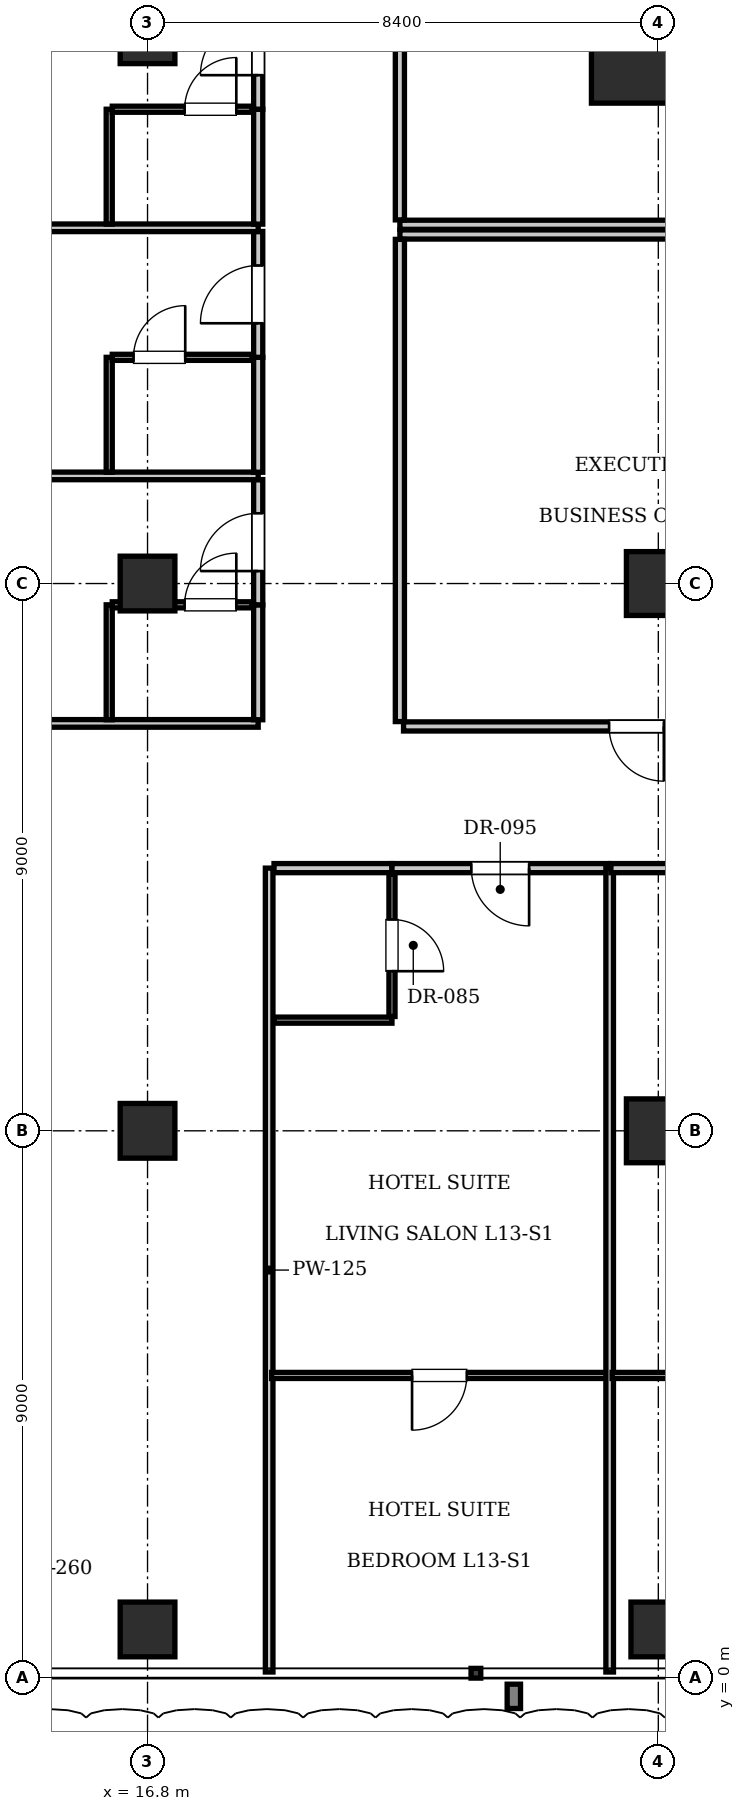
"""IFC4 building model, lengths in metres.
Left out: names, types, materials, properties, quantities, classifications, styles, units other than length and angle.
Written with IfcOpenShell. Run it as: python <this file> out.ifc"""

import sys

from ifc_helpers import new_model, si_unit, direction, frame, frame_2d, origin, origin_2d, place, context, subcontext, project, spatial, rectangle, extrude, element, fill, save


model = new_model("IFC4")
c1 = context("Model", 3, precision=1e-05, world=origin(), true_north=direction((0.0, 1.0)))
c2 = subcontext(c1, "Body", "Model", "MODEL_VIEW")
j1 = project(units=[si_unit("LENGTHUNIT", "METRE"), si_unit("PLANEANGLEUNIT", "RADIAN")], contexts=[c1])
p1 = place(None, origin())
s1 = spatial("IfcSite", under=j1, at=p1, CompositionType="ELEMENT")
p2 = place(p1, origin())
s2 = spatial("IfcBuilding", under=s1, at=p2, CompositionType="ELEMENT")
p3 = place(p2, frame((0.0, 0.0, 57.75)))
s3 = spatial("IfcBuildingStorey", under=s2, at=p3, CompositionType="ELEMENT", Elevation=57.75)
p4 = place(p3, frame((25.2, 27.0, 0.0), z_axis=(0.0, 0.0, 1.0), x_axis=(1.0, 0.0, 0.0)))
e1 = element("IfcColumn", 1, at=p4, inside=s3, PredefinedType="COLUMN", context=c2, shape_type="SweptSolid", body=[
    extrude(rectangle(XDim=2.2, YDim=2.2, at=origin_2d()), origin(), (0.0, 0.0, 1.0), 3.85),
])
for number, where, z_axis, x_axis in (
    (2, (25.2, 18.0, 0.0), (0.0, 0.0, 1.0), (1.0, 0.0, 0.0)),
    (3, (25.2, 9.0, 0.0), (0.0, 0.0, 1.0), (1.0, 0.0, 0.0)),
):
    element("IfcColumn", number, at=place(p3, frame(where, z_axis=z_axis, x_axis=x_axis)), inside=s3, PredefinedType="COLUMN", context=c2, shape_type="SweptSolid", body=[
        extrude(rectangle(XDim=1.05, YDim=1.05, at=origin_2d()), origin(), (0.0, 0.0, 1.0), 3.85),
    ])
for number, where, z_axis, x_axis in (
    (4, (16.8, 9.0, 0.0), (0.0, 0.0, 1.0), (1.0, 0.0, 0.0)),
    (5, (16.8, 18.0, 0.0), (0.0, 0.0, 1.0), (1.0, 0.0, 0.0)),
    (6, (16.8, 27.0, 0.0), (0.0, 0.0, 1.0), (1.0, 0.0, 0.0)),
    (7, (16.8, 0.8, 0.0), (0.0, 0.0, 1.0), (1.0, 0.0, 0.0)),
    (8, (25.2, 0.8, 0.0), (0.0, 0.0, 1.0), (1.0, 0.0, 0.0)),
):
    element("IfcColumn", number, at=place(p3, frame(where, z_axis=z_axis, x_axis=x_axis)), inside=s3, PredefinedType="COLUMN", context=c2, shape_type="SweptSolid", body=[
        extrude(rectangle(XDim=0.9, YDim=0.9, at=origin_2d()), origin(), (0.0, 0.0, 1.0), 3.85),
    ])
p5 = place(p3, frame((20.95, 23.9, 0.0), z_axis=(0.0, 0.0, 1.0), x_axis=(1.0, 0.0, 0.0)))
e9 = element("IfcWall", 9, at=p5, inside=s3, PredefinedType="PARTITIONING", context=c2, shape_type="SweptSolid", body=[
    extrude(rectangle(XDim=33.7, YDim=0.15, at=frame_2d((16.85, 0.0))), origin(), (0.0, 0.0, 1.0), 3.61),
])
p6 = place(p3, frame((20.95, 23.98, 0.0), z_axis=(0.0, 0.0, 1.0), x_axis=(0.0, 1.0, 0.0)))
e10 = element("IfcWall", 10, at=p6, inside=s3, PredefinedType="PARTITIONING", context=c2, shape_type="SweptSolid", body=[
    extrude(rectangle(XDim=7.94, YDim=0.15, at=frame_2d((3.97, 0.0))), origin(), (0.0, 0.0, 1.0), 3.255),
])
p7 = place(p3, frame((20.95, 23.74, 0.0), z_axis=(0.0, 0.0, 1.0), x_axis=(1.0, 0.0, 0.0)))
e11 = element("IfcWall", 11, at=p7, inside=s3, PredefinedType="PARTITIONING", context=c2, shape_type="SweptSolid", body=[
    extrude(rectangle(XDim=33.7, YDim=0.15, at=frame_2d((16.85, 0.0))), origin(), (0.0, 0.0, 1.0), 3.61),
])
p8 = place(p3, frame((20.95, 15.73, 0.0), z_axis=(0.0, 0.0, 1.0), x_axis=(0.0, 1.0, 0.0)))
e12 = element("IfcWall", 12, at=p8, inside=s3, PredefinedType="PARTITIONING", context=c2, shape_type="SweptSolid", body=[
    extrude(rectangle(XDim=7.93, YDim=0.15, at=frame_2d((3.965, 0.0))), origin(), (0.0, 0.0, 1.0), 3.207),
])
p9 = place(p3, frame((21.01, 15.65, 0.0), z_axis=(0.0, 0.0, 1.0), x_axis=(1.0, 0.0, 0.0)))
e13 = element("IfcWall", 13, at=p9, inside=s3, PredefinedType="PARTITIONING", context=c2, shape_type="SweptSolid", body=[
    extrude(rectangle(XDim=7.661, YDim=0.15, at=frame_2d((3.831, 0.0))), origin(), (0.0, 0.0, 1.0), 3.61),
])
p10 = place(p9, frame((3.381, 0.0, 0.0)))
e14 = element("IfcOpeningElement", 14, at=p10, cuts=e13, PredefinedType="OPENING", context=c2, shape_type="SweptSolid", body=[
    extrude(rectangle(XDim=0.9, YDim=2.1, at=frame_2d((0.45, 1.05))), frame((0.0, 0.085, 0.0), z_axis=(0.0, -1.0, 0.0), x_axis=(1.0, 0.0, 0.0)), (0.0, 0.0, 1.0), 0.17),
])
p11 = place(p3, frame((18.8, 0.1, 0.0), z_axis=(0.0, 0.0, 1.0), x_axis=(0.0, 1.0, 0.0)))
e15 = element("IfcWall", 15, at=p11, inside=s3, PredefinedType="PARTITIONING", context=c2, shape_type="SweptSolid", body=[
    extrude(rectangle(XDim=13.22, YDim=0.125, at=frame_2d((6.61, 0.0))), origin(), (0.0, 0.0, 1.0), 3.61),
])
p12 = place(p3, frame((18.88, 13.32, 0.0), z_axis=(0.0, 0.0, 1.0), x_axis=(1.0, 0.0, 0.0)))
e16 = element("IfcWall", 16, at=p12, inside=s3, PredefinedType="PARTITIONING", context=c2, shape_type="SweptSolid", body=[
    extrude(rectangle(XDim=1.94, YDim=0.15, at=frame_2d((0.97, 0.0))), origin(), (0.0, 0.0, 1.0), 3.61),
])
p13 = place(p3, frame((18.88, 10.82, 0.0), z_axis=(0.0, 0.0, 1.0), x_axis=(1.0, 0.0, 0.0)))
e17 = element("IfcWall", 17, at=p13, inside=s3, PredefinedType="PARTITIONING", context=c2, shape_type="SweptSolid", body=[
    extrude(rectangle(XDim=1.94, YDim=0.1, at=frame_2d((0.97, 0.0))), origin(), (0.0, 0.0, 1.0), 3.61),
])
p14 = place(p3, frame((20.82, 10.88, 0.0), z_axis=(0.0, 0.0, 1.0), x_axis=(0.0, 1.0, 0.0)))
e18 = element("IfcWall", 18, at=p14, inside=s3, PredefinedType="PARTITIONING", context=c2, shape_type="SweptSolid", body=[
    extrude(rectangle(XDim=2.34, YDim=0.1, at=frame_2d((1.17, 0.0))), origin(), (0.0, 0.0, 1.0), 3.61),
])
p15 = place(p14, frame((0.745, 0.0, 0.0)))
e19 = element("IfcOpeningElement", 19, at=p15, cuts=e18, PredefinedType="OPENING", context=c2, shape_type="SweptSolid", body=[
    extrude(rectangle(XDim=0.85, YDim=2.1, at=frame_2d((0.425, 1.05))), frame((0.0, 0.06, 0.0), z_axis=(0.0, -1.0, 0.0), x_axis=(1.0, 0.0, 0.0)), (0.0, 0.0, 1.0), 0.12),
])
p16 = place(p3, frame((20.82, 13.32, 0.0), z_axis=(0.0, 0.0, 1.0), x_axis=(1.0, 0.0, 0.0)))
e20 = element("IfcWall", 20, at=p16, inside=s3, PredefinedType="PARTITIONING", context=c2, shape_type="SweptSolid", body=[
    extrude(rectangle(XDim=3.56, YDim=0.15, at=frame_2d((1.78, 0.0))), origin(), (0.0, 0.0, 1.0), 3.61),
])
p17 = place(p16, frame((1.305, 0.0, 0.0)))
e21 = element("IfcOpeningElement", 21, at=p17, cuts=e20, PredefinedType="OPENING", context=c2, shape_type="SweptSolid", body=[
    extrude(rectangle(XDim=0.95, YDim=2.15, at=frame_2d((0.475, 1.075))), frame((0.0, 0.085, 0.0), z_axis=(0.0, -1.0, 0.0), x_axis=(1.0, 0.0, 0.0)), (0.0, 0.0, 1.0), 0.17),
])
p18 = place(p3, frame((18.84, 4.977, 0.0), z_axis=(0.0, 0.0, 1.0), x_axis=(1.0, 0.0, 0.0)))
e22 = element("IfcWall", 22, at=p18, inside=s3, PredefinedType="PARTITIONING", context=c2, shape_type="SweptSolid", body=[
    extrude(rectangle(XDim=5.52, YDim=0.1, at=frame_2d((2.76, 0.0))), origin(), (0.0, 0.0, 1.0), 3.61),
])
p19 = place(p18, frame((2.31, 0.0, 0.0)))
e23 = element("IfcOpeningElement", 23, at=p19, cuts=e22, PredefinedType="OPENING", context=c2, shape_type="SweptSolid", body=[
    extrude(rectangle(XDim=0.9, YDim=2.1, at=frame_2d((0.45, 1.05))), frame((0.0, 0.06, 0.0), z_axis=(0.0, -1.0, 0.0), x_axis=(1.0, 0.0, 0.0)), (0.0, 0.0, 1.0), 0.12),
])
p20 = place(p3, frame((24.4, 0.1, 0.0), z_axis=(0.0, 0.0, 1.0), x_axis=(0.0, 1.0, 0.0)))
e24 = element("IfcWall", 24, at=p20, inside=s3, PredefinedType="PARTITIONING", context=c2, shape_type="SweptSolid", body=[
    extrude(rectangle(XDim=13.22, YDim=0.125, at=frame_2d((6.61, 0.0))), origin(), (0.0, 0.0, 1.0), 3.61),
])
p21 = place(p3, frame((24.42, 13.32, 0.0), z_axis=(0.0, 0.0, 1.0), x_axis=(1.0, 0.0, 0.0)))
e25 = element("IfcWall", 25, at=p21, inside=s3, PredefinedType="PARTITIONING", context=c2, shape_type="SweptSolid", body=[
    extrude(rectangle(XDim=3.56, YDim=0.15, at=frame_2d((1.78, 0.0))), origin(), (0.0, 0.0, 1.0), 3.61),
])
p22 = place(p21, frame((1.305, 0.0, 0.0)))
e26 = element("IfcOpeningElement", 26, at=p22, cuts=e25, PredefinedType="OPENING", context=c2, shape_type="SweptSolid", body=[
    extrude(rectangle(XDim=0.95, YDim=2.15, at=frame_2d((0.475, 1.075))), frame((0.0, 0.085, 0.0), z_axis=(0.0, -1.0, 0.0), x_axis=(1.0, 0.0, 0.0)), (0.0, 0.0, 1.0), 0.17),
])
p23 = place(p3, frame((24.44, 4.977, 0.0), z_axis=(0.0, 0.0, 1.0), x_axis=(1.0, 0.0, 0.0)))
e27 = element("IfcWall", 27, at=p23, inside=s3, PredefinedType="PARTITIONING", context=c2, shape_type="SweptSolid", body=[
    extrude(rectangle(XDim=5.52, YDim=0.1, at=frame_2d((2.76, 0.0))), origin(), (0.0, 0.0, 1.0), 3.61),
])
p24 = place(p23, frame((2.31, 0.0, 0.0)))
e28 = element("IfcOpeningElement", 28, at=p24, cuts=e27, PredefinedType="OPENING", context=c2, shape_type="SweptSolid", body=[
    extrude(rectangle(XDim=0.9, YDim=2.1, at=frame_2d((0.45, 1.05))), frame((0.0, 0.06, 0.0), z_axis=(0.0, -1.0, 0.0), x_axis=(1.0, 0.0, 0.0)), (0.0, 0.0, 1.0), 0.12),
])
p25 = place(p3, frame((10.9, 15.7, 0.0), z_axis=(0.0, 0.0, 1.0), x_axis=(1.0, 0.0, 0.0)))
e29 = element("IfcWall", 29, at=p25, inside=s3, PredefinedType="PARTITIONING", context=c2, shape_type="SweptSolid", body=[
    extrude(rectangle(XDim=7.72, YDim=0.125, at=frame_2d((3.86, 0.0))), origin(), (0.0, 0.0, 1.0), 3.61),
])
p26 = place(p3, frame((18.62, 15.76, 0.0), z_axis=(0.0, 0.0, 1.0), x_axis=(0.0, 1.0, 0.0)))
e30 = element("IfcWall", 30, at=p26, inside=s3, PredefinedType="PARTITIONING", context=c2, shape_type="SweptSolid", body=[
    extrude(rectangle(XDim=1.89, YDim=0.15, at=frame_2d((0.945, 0.0))), origin(), (0.0, 0.0, 1.0), 3.61),
])
p27 = place(p3, frame((18.62, 17.65, 0.0), z_axis=(0.0, 0.0, 1.0), x_axis=(0.0, 1.0, 0.0)))
e31 = element("IfcWall", 31, at=p27, inside=s3, PredefinedType="PARTITIONING", context=c2, shape_type="SweptSolid", body=[
    extrude(rectangle(XDim=2.06, YDim=0.15, at=frame_2d((1.03, 0.0))), origin(), (0.0, 0.0, 1.0), 3.61),
])
p28 = place(p27, frame((0.555, 0.0, 0.0)))
e32 = element("IfcOpeningElement", 32, at=p28, cuts=e31, PredefinedType="OPENING", context=c2, shape_type="SweptSolid", body=[
    extrude(rectangle(XDim=0.95, YDim=2.15, at=frame_2d((0.475, 1.075))), frame((0.0, 0.085, 0.0), z_axis=(0.0, -1.0, 0.0), x_axis=(1.0, 0.0, 0.0)), (0.0, 0.0, 1.0), 0.17),
])
p29 = place(p3, frame((16.17, 15.76, 0.0), z_axis=(0.0, 0.0, 1.0), x_axis=(0.0, 1.0, 0.0)))
e33 = element("IfcWall", 33, at=p29, inside=s3, PredefinedType="PARTITIONING", context=c2, shape_type="SweptSolid", body=[
    extrude(rectangle(XDim=1.89, YDim=0.1, at=frame_2d((0.945, 0.0))), origin(), (0.0, 0.0, 1.0), 3.61),
])
p30 = place(p3, frame((16.22, 17.65, 0.0), z_axis=(0.0, 0.0, 1.0), x_axis=(1.0, 0.0, 0.0)))
e34 = element("IfcWall", 34, at=p30, inside=s3, PredefinedType="PARTITIONING", context=c2, shape_type="SweptSolid", body=[
    extrude(rectangle(XDim=2.3, YDim=0.1, at=frame_2d((1.15, 0.0))), origin(), (0.0, 0.0, 1.0), 3.61),
])
p31 = place(p30, frame((1.19, 0.0, 0.0)))
e35 = element("IfcOpeningElement", 35, at=p31, cuts=e34, PredefinedType="OPENING", context=c2, shape_type="SweptSolid", body=[
    extrude(rectangle(XDim=0.85, YDim=2.1, at=frame_2d((0.425, 1.05))), frame((0.0, 0.06, 0.0), z_axis=(0.0, -1.0, 0.0), x_axis=(1.0, 0.0, 0.0)), (0.0, 0.0, 1.0), 0.12),
])
p32 = place(p3, frame((10.9, 19.77, 0.0), z_axis=(0.0, 0.0, 1.0), x_axis=(1.0, 0.0, 0.0)))
e36 = element("IfcWall", 36, at=p32, inside=s3, PredefinedType="PARTITIONING", context=c2, shape_type="SweptSolid", body=[
    extrude(rectangle(XDim=7.72, YDim=0.125, at=frame_2d((3.86, 0.0))), origin(), (0.0, 0.0, 1.0), 3.61),
])
p33 = place(p3, frame((18.62, 19.83, 0.0), z_axis=(0.0, 0.0, 1.0), x_axis=(0.0, 1.0, 0.0)))
e37 = element("IfcWall", 37, at=p33, inside=s3, PredefinedType="PARTITIONING", context=c2, shape_type="SweptSolid", body=[
    extrude(rectangle(XDim=1.89, YDim=0.15, at=frame_2d((0.945, 0.0))), origin(), (0.0, 0.0, 1.0), 3.61),
])
p34 = place(p3, frame((18.62, 21.72, 0.0), z_axis=(0.0, 0.0, 1.0), x_axis=(0.0, 1.0, 0.0)))
e38 = element("IfcWall", 38, at=p34, inside=s3, PredefinedType="PARTITIONING", context=c2, shape_type="SweptSolid", body=[
    extrude(rectangle(XDim=2.07, YDim=0.15, at=frame_2d((1.035, 0.0))), origin(), (0.0, 0.0, 1.0), 3.61),
])
p35 = place(p34, frame((0.56, 0.0, 0.0)))
e39 = element("IfcOpeningElement", 39, at=p35, cuts=e38, PredefinedType="OPENING", context=c2, shape_type="SweptSolid", body=[
    extrude(rectangle(XDim=0.95, YDim=2.15, at=frame_2d((0.475, 1.075))), frame((0.0, 0.085, 0.0), z_axis=(0.0, -1.0, 0.0), x_axis=(1.0, 0.0, 0.0)), (0.0, 0.0, 1.0), 0.17),
])
p36 = place(p3, frame((16.17, 19.83, 0.0), z_axis=(0.0, 0.0, 1.0), x_axis=(0.0, 1.0, 0.0)))
e40 = element("IfcWall", 40, at=p36, inside=s3, PredefinedType="PARTITIONING", context=c2, shape_type="SweptSolid", body=[
    extrude(rectangle(XDim=1.89, YDim=0.1, at=frame_2d((0.945, 0.0))), origin(), (0.0, 0.0, 1.0), 3.61),
])
p37 = place(p3, frame((16.22, 21.72, 0.0), z_axis=(0.0, 0.0, 1.0), x_axis=(1.0, 0.0, 0.0)))
e41 = element("IfcWall", 41, at=p37, inside=s3, PredefinedType="PARTITIONING", context=c2, shape_type="SweptSolid", body=[
    extrude(rectangle(XDim=2.3, YDim=0.1, at=frame_2d((1.15, 0.0))), origin(), (0.0, 0.0, 1.0), 3.61),
])
p38 = place(p37, frame((0.35, 0.0, 0.0)))
e42 = element("IfcOpeningElement", 42, at=p38, cuts=e41, PredefinedType="OPENING", context=c2, shape_type="SweptSolid", body=[
    extrude(rectangle(XDim=0.85, YDim=2.1, at=frame_2d((0.425, 1.05))), frame((0.0, 0.06, 0.0), z_axis=(0.0, -1.0, 0.0), x_axis=(1.0, 0.0, 0.0)), (0.0, 0.0, 1.0), 0.12),
])
p39 = place(p3, frame((10.9, 23.85, 0.0), z_axis=(0.0, 0.0, 1.0), x_axis=(1.0, 0.0, 0.0)))
e43 = element("IfcWall", 43, at=p39, inside=s3, PredefinedType="PARTITIONING", context=c2, shape_type="SweptSolid", body=[
    extrude(rectangle(XDim=7.72, YDim=0.125, at=frame_2d((3.86, 0.0))), origin(), (0.0, 0.0, 1.0), 3.61),
])
p40 = place(p3, frame((18.62, 23.91, 0.0), z_axis=(0.0, 0.0, 1.0), x_axis=(0.0, 1.0, 0.0)))
e44 = element("IfcWall", 44, at=p40, inside=s3, PredefinedType="PARTITIONING", context=c2, shape_type="SweptSolid", body=[
    extrude(rectangle(XDim=1.89, YDim=0.15, at=frame_2d((0.945, 0.0))), origin(), (0.0, 0.0, 1.0), 3.61),
])
p41 = place(p3, frame((18.62, 25.8, 0.0), z_axis=(0.0, 0.0, 1.0), x_axis=(0.0, 1.0, 0.0)))
e45 = element("IfcWall", 45, at=p41, inside=s3, PredefinedType="PARTITIONING", context=c2, shape_type="SweptSolid", body=[
    extrude(rectangle(XDim=2.07, YDim=0.15, at=frame_2d((1.035, 0.0))), origin(), (0.0, 0.0, 1.0), 3.61),
])
p42 = place(p41, frame((0.56, 0.0, 0.0)))
e46 = element("IfcOpeningElement", 46, at=p42, cuts=e45, PredefinedType="OPENING", context=c2, shape_type="SweptSolid", body=[
    extrude(rectangle(XDim=0.95, YDim=2.15, at=frame_2d((0.475, 1.075))), frame((0.0, 0.085, 0.0), z_axis=(0.0, -1.0, 0.0), x_axis=(1.0, 0.0, 0.0)), (0.0, 0.0, 1.0), 0.17),
])
p43 = place(p3, frame((16.17, 23.91, 0.0), z_axis=(0.0, 0.0, 1.0), x_axis=(0.0, 1.0, 0.0)))
e47 = element("IfcWall", 47, at=p43, inside=s3, PredefinedType="PARTITIONING", context=c2, shape_type="SweptSolid", body=[
    extrude(rectangle(XDim=1.89, YDim=0.1, at=frame_2d((0.945, 0.0))), origin(), (0.0, 0.0, 1.0), 3.61),
])
p44 = place(p3, frame((16.22, 25.8, 0.0), z_axis=(0.0, 0.0, 1.0), x_axis=(1.0, 0.0, 0.0)))
e48 = element("IfcWall", 48, at=p44, inside=s3, PredefinedType="PARTITIONING", context=c2, shape_type="SweptSolid", body=[
    extrude(rectangle(XDim=2.3, YDim=0.1, at=frame_2d((1.15, 0.0))), origin(), (0.0, 0.0, 1.0), 3.61),
])
p45 = place(p44, frame((1.19, 0.0, 0.0)))
e49 = element("IfcOpeningElement", 49, at=p45, cuts=e48, PredefinedType="OPENING", context=c2, shape_type="SweptSolid", body=[
    extrude(rectangle(XDim=0.85, YDim=2.1, at=frame_2d((0.425, 1.05))), frame((0.0, 0.06, 0.0), z_axis=(0.0, -1.0, 0.0), x_axis=(1.0, 0.0, 0.0)), (0.0, 0.0, 1.0), 0.12),
])
p46 = place(p10, frame((0.9, 0.0, 0.0), z_axis=(0.0, 0.0, 1.0), x_axis=(-1.0, 0.0, 0.0)))
e50 = element("IfcDoor", 50, at=p46, inside=s3, OperationType="SINGLE_SWING_LEFT", PredefinedType="DOOR", context=c2, shape_type="SweptSolid", body=[
    extrude(rectangle(XDim=0.9, YDim=2.1, at=frame_2d((0.45, 1.05))), frame((0.0, 0.025, 0.0), z_axis=(0.0, -1.0, 0.0), x_axis=(1.0, 0.0, 0.0)), (0.0, 0.0, 1.0), 0.05),
])
fill(e14, e50)
p47 = place(p15, frame((0.85, 0.0, 0.0), z_axis=(0.0, 0.0, 1.0), x_axis=(-1.0, 0.0, 0.0)))
e51 = element("IfcDoor", 51, at=p47, inside=s3, OperationType="SINGLE_SWING_RIGHT", PredefinedType="DOOR", context=c2, shape_type="SweptSolid", body=[
    extrude(rectangle(XDim=0.85, YDim=2.1, at=frame_2d((0.425, 1.05))), frame((0.0, 0.025, 0.0), z_axis=(0.0, -1.0, 0.0), x_axis=(1.0, 0.0, 0.0)), (0.0, 0.0, 1.0), 0.05),
])
fill(e19, e51)
p48 = place(p17, frame((0.95, 0.0, 0.0), z_axis=(0.0, 0.0, 1.0), x_axis=(-1.0, 0.0, 0.0)))
e52 = element("IfcDoor", 52, at=p48, inside=s3, OperationType="SINGLE_SWING_LEFT", PredefinedType="DOOR", context=c2, shape_type="SweptSolid", body=[
    extrude(rectangle(XDim=0.95, YDim=2.15, at=frame_2d((0.475, 1.075))), frame((0.0, 0.025, 0.0), z_axis=(0.0, -1.0, 0.0), x_axis=(1.0, 0.0, 0.0)), (0.0, 0.0, 1.0), 0.05),
])
fill(e21, e52)
p49 = place(p19, frame((0.9, 0.0, 0.0), z_axis=(0.0, 0.0, 1.0), x_axis=(-1.0, 0.0, 0.0)))
e53 = element("IfcDoor", 53, at=p49, inside=s3, OperationType="SINGLE_SWING_RIGHT", PredefinedType="DOOR", context=c2, shape_type="SweptSolid", body=[
    extrude(rectangle(XDim=0.9, YDim=2.1, at=frame_2d((0.45, 1.05))), frame((0.0, 0.025, 0.0), z_axis=(0.0, -1.0, 0.0), x_axis=(1.0, 0.0, 0.0)), (0.0, 0.0, 1.0), 0.05),
])
fill(e23, e53)
p50 = place(p31, origin())
e54 = element("IfcDoor", 54, at=p50, inside=s3, OperationType="SINGLE_SWING_RIGHT", PredefinedType="DOOR", context=c2, shape_type="SweptSolid", body=[
    extrude(rectangle(XDim=0.85, YDim=2.1, at=frame_2d((0.425, 1.05))), frame((0.0, 0.025, 0.0), z_axis=(0.0, -1.0, 0.0), x_axis=(1.0, 0.0, 0.0)), (0.0, 0.0, 1.0), 0.05),
])
fill(e35, e54)
p51 = place(p28, origin())
e55 = element("IfcDoor", 55, at=p51, inside=s3, OperationType="SINGLE_SWING_LEFT", PredefinedType="DOOR", context=c2, shape_type="SweptSolid", body=[
    extrude(rectangle(XDim=0.95, YDim=2.15, at=frame_2d((0.475, 1.075))), frame((0.0, 0.025, 0.0), z_axis=(0.0, -1.0, 0.0), x_axis=(1.0, 0.0, 0.0)), (0.0, 0.0, 1.0), 0.05),
])
fill(e32, e55)
p52 = place(p38, origin())
e56 = element("IfcDoor", 56, at=p52, inside=s3, OperationType="SINGLE_SWING_RIGHT", PredefinedType="DOOR", context=c2, shape_type="SweptSolid", body=[
    extrude(rectangle(XDim=0.85, YDim=2.1, at=frame_2d((0.425, 1.05))), frame((0.0, 0.025, 0.0), z_axis=(0.0, -1.0, 0.0), x_axis=(1.0, 0.0, 0.0)), (0.0, 0.0, 1.0), 0.05),
])
fill(e42, e56)
p53 = place(p35, origin())
e57 = element("IfcDoor", 57, at=p53, inside=s3, OperationType="SINGLE_SWING_LEFT", PredefinedType="DOOR", context=c2, shape_type="SweptSolid", body=[
    extrude(rectangle(XDim=0.95, YDim=2.15, at=frame_2d((0.475, 1.075))), frame((0.0, 0.025, 0.0), z_axis=(0.0, -1.0, 0.0), x_axis=(1.0, 0.0, 0.0)), (0.0, 0.0, 1.0), 0.05),
])
fill(e39, e57)
p54 = place(p45, origin())
e58 = element("IfcDoor", 58, at=p54, inside=s3, OperationType="SINGLE_SWING_RIGHT", PredefinedType="DOOR", context=c2, shape_type="SweptSolid", body=[
    extrude(rectangle(XDim=0.85, YDim=2.1, at=frame_2d((0.425, 1.05))), frame((0.0, 0.025, 0.0), z_axis=(0.0, -1.0, 0.0), x_axis=(1.0, 0.0, 0.0)), (0.0, 0.0, 1.0), 0.05),
])
fill(e49, e58)
p55 = place(p42, origin())
e59 = element("IfcDoor", 59, at=p55, inside=s3, OperationType="SINGLE_SWING_LEFT", PredefinedType="DOOR", context=c2, shape_type="SweptSolid", body=[
    extrude(rectangle(XDim=0.95, YDim=2.15, at=frame_2d((0.475, 1.075))), frame((0.0, 0.025, 0.0), z_axis=(0.0, -1.0, 0.0), x_axis=(1.0, 0.0, 0.0)), (0.0, 0.0, 1.0), 0.05),
])
fill(e46, e59)
save(model, sys.argv[1])
